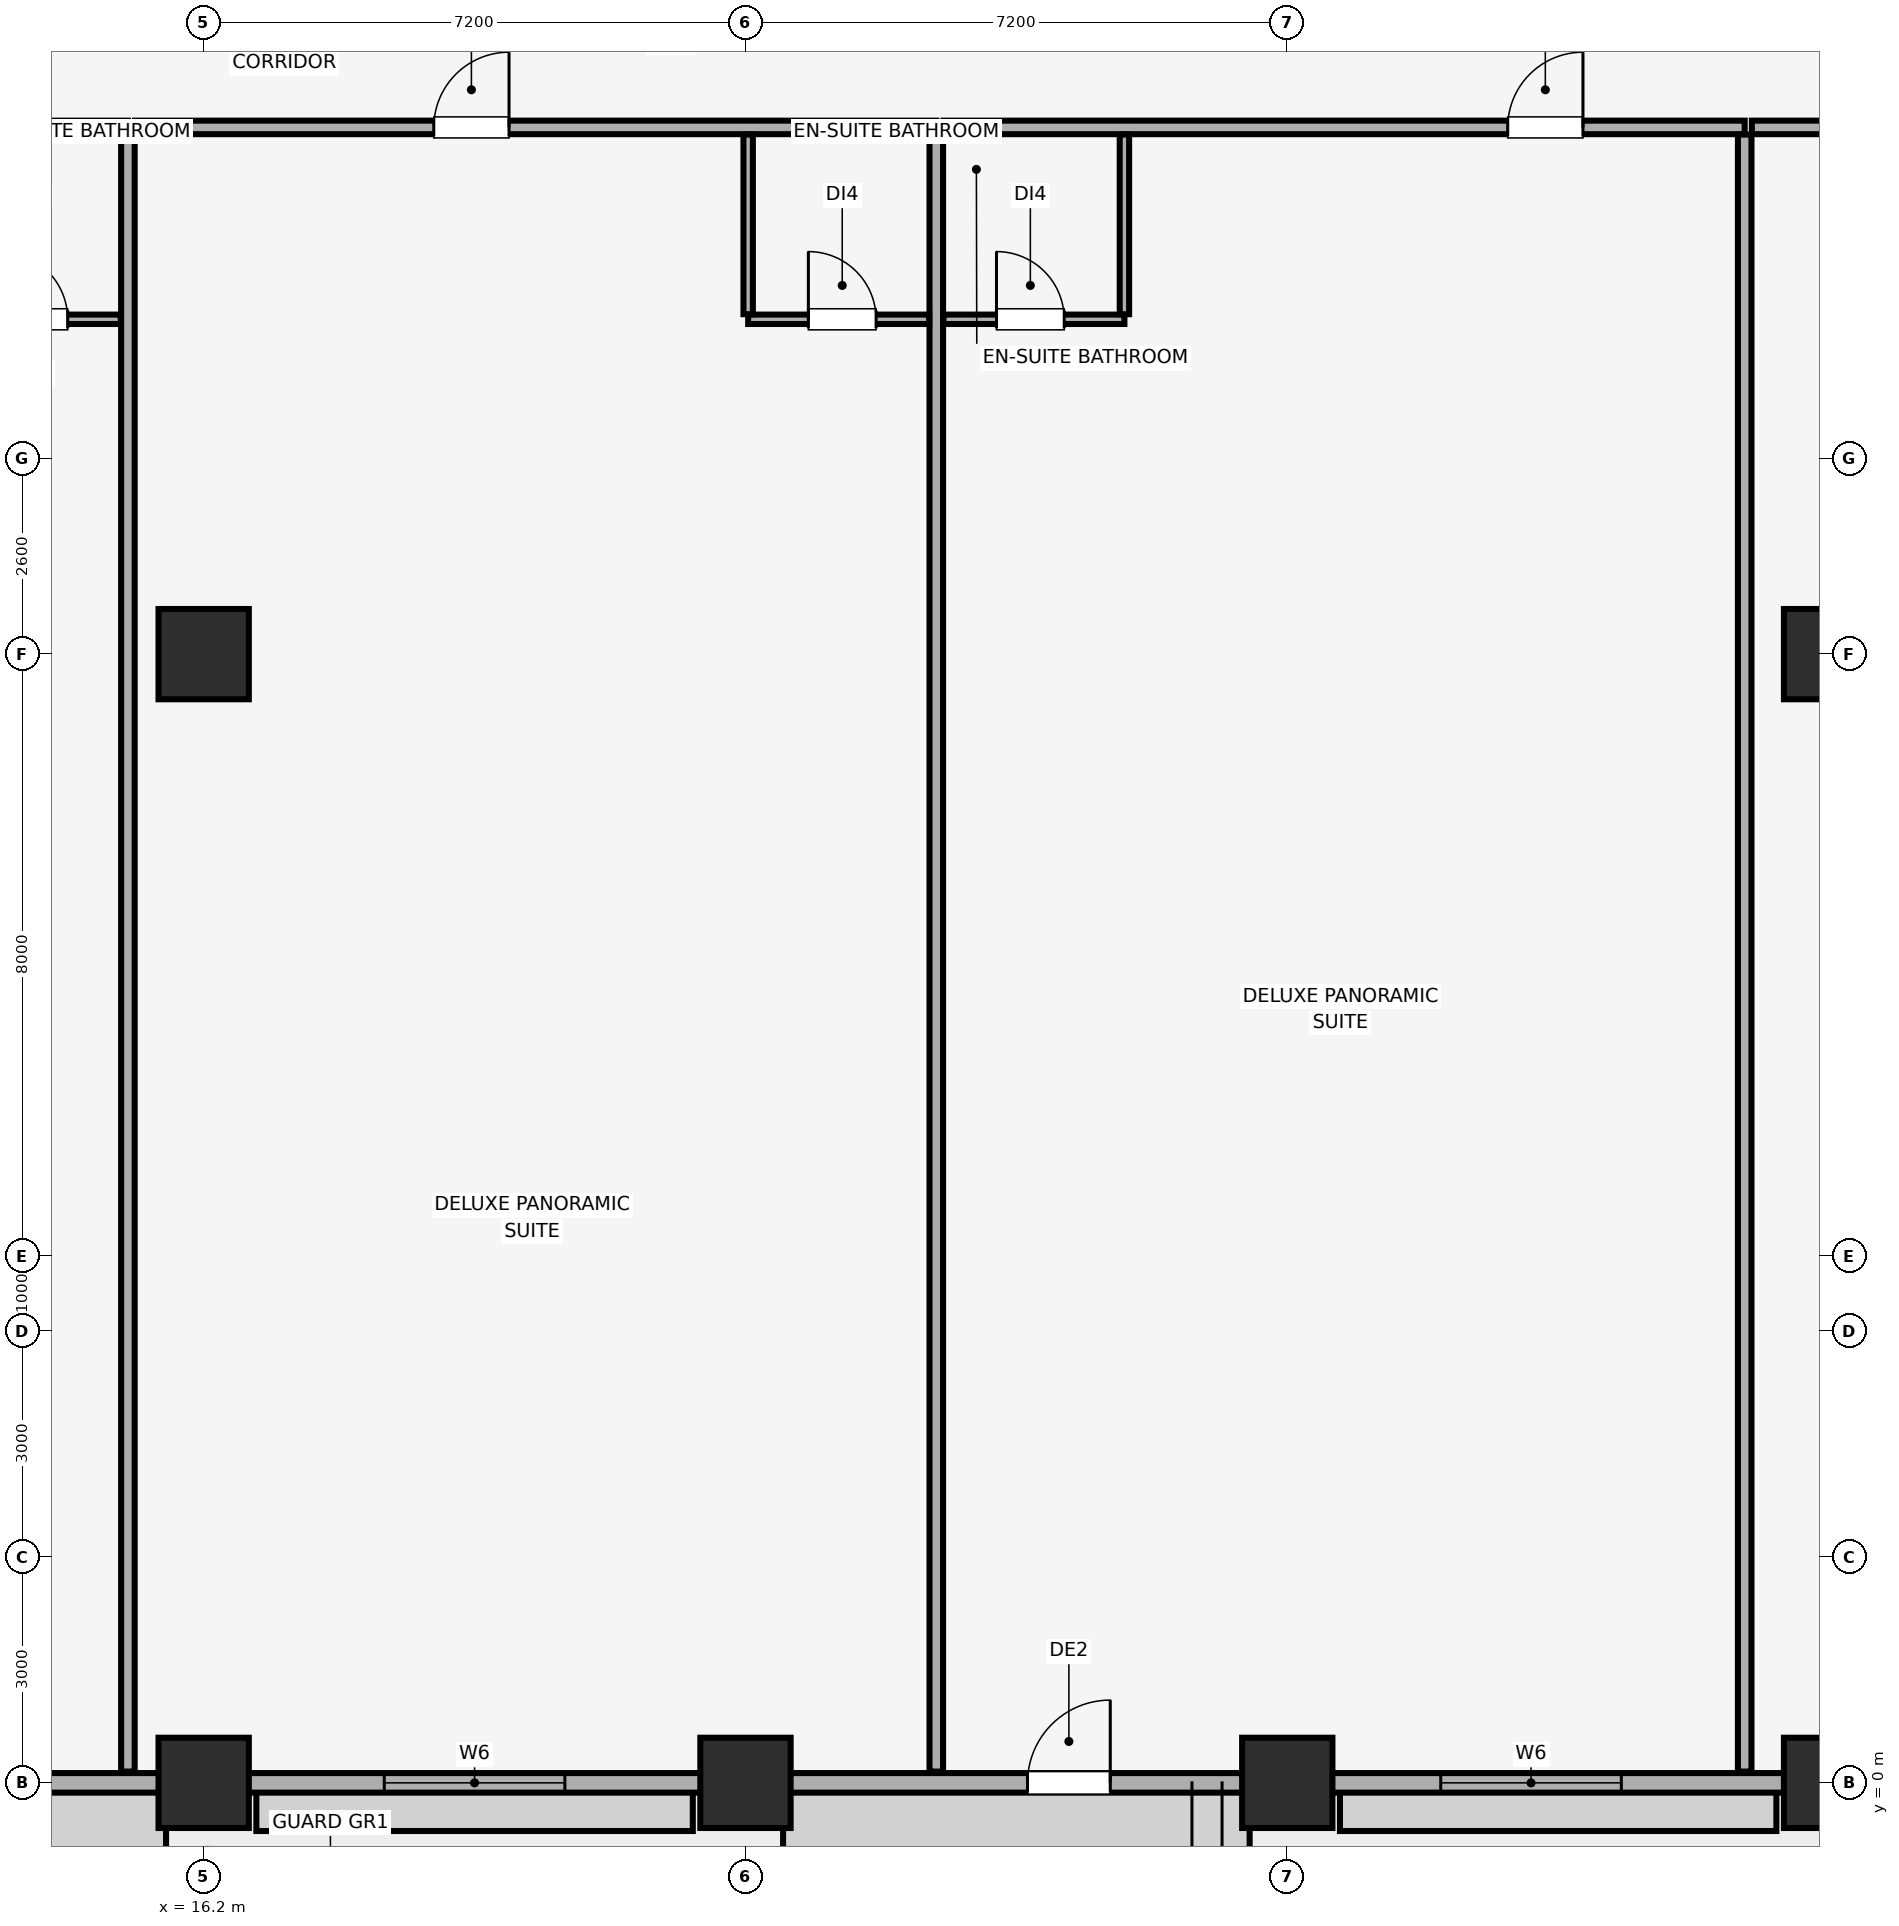
"""IFC4 building model, lengths in metres.
Left out: names, types, materials, properties, quantities, classifications, styles, units other than length and angle.
Written with IfcOpenShell. Run it as: python <this file> out.ifc"""

import sys

from ifc_helpers import new_model, si_unit, direction, frame, frame_2d, origin, origin_2d, place, context, subcontext, project, spatial, rectangle, extrude, element, fill, save


model = new_model("IFC4")
c1 = context("Model", 3, precision=1e-05, world=origin(), true_north=direction((0.0, 1.0)))
c2 = subcontext(c1, "Body", "Model", "MODEL_VIEW")
j1 = project(units=[si_unit("LENGTHUNIT", "METRE"), si_unit("PLANEANGLEUNIT", "RADIAN")], contexts=[c1])
p1 = place(None, origin())
s1 = spatial("IfcSite", under=j1, at=p1, CompositionType="ELEMENT")
p2 = place(p1, origin())
s2 = spatial("IfcBuilding", under=s1, at=p2, CompositionType="ELEMENT")
p3 = place(p2, frame((0.0, 0.0, 104.3)))
s3 = spatial("IfcBuildingStorey", under=s2, at=p3, CompositionType="ELEMENT", Elevation=104.3)
for number, where, z_axis, x_axis in (
    (1, (16.2, 0.0, 0.0), (0.0, 0.0, 1.0), (1.0, 0.0, 0.0)),
    (2, (23.4, 0.0, 0.0), (0.0, 0.0, 1.0), (1.0, 0.0, 0.0)),
    (3, (30.6, 0.0, 0.0), (0.0, 0.0, 1.0), (1.0, 0.0, 0.0)),
    (4, (37.8, 0.0, 0.0), (0.0, 0.0, 1.0), (1.0, 0.0, 0.0)),
    (5, (16.2, 15.0, 0.0), (0.0, 0.0, 1.0), (1.0, 0.0, 0.0)),
    (6, (37.8, 15.0, 0.0), (0.0, 0.0, 1.0), (1.0, 0.0, 0.0)),
):
    element("IfcColumn", number, at=place(p3, frame(where, z_axis=z_axis, x_axis=x_axis)), inside=s3, PredefinedType="COLUMN", context=c2, shape_type="SweptSolid", body=[
        extrude(rectangle(XDim=1.2, YDim=1.2, at=origin_2d()), origin(), (0.0, 0.0, 1.0), 3.51),
    ])
p4 = place(p3, frame((4.2, 0.0, 0.0), z_axis=(0.0, 0.0, 1.0), x_axis=(1.0, 0.0, 0.0)))
e7 = element("IfcWall", 7, at=p4, inside=s3, PredefinedType="SOLIDWALL", context=c2, shape_type="SweptSolid", body=[
    extrude(rectangle(XDim=75.6, YDim=0.26, at=frame_2d((37.8, 0.0))), origin(), (0.0, 0.0, 1.0), 2.56),
])
p5 = place(p4, frame((22.948, 0.0, 0.0)))
e8 = element("IfcOpeningElement", 8, at=p5, cuts=e7, PredefinedType="OPENING", context=c2, shape_type="SweptSolid", body=[
    extrude(rectangle(XDim=1.1, YDim=2.15, at=frame_2d((0.55, 1.075))), frame((0.0, 0.14, 0.0), z_axis=(0.0, -1.0, 0.0), x_axis=(1.0, 0.0, 0.0)), (0.0, 0.0, 1.0), 0.28),
])
p6 = place(p4, frame((44.61, 0.0, 0.0)))
e9 = element("IfcOpeningElement", 9, at=p6, cuts=e7, PredefinedType="OPENING", context=c2, shape_type="SweptSolid", body=[
    extrude(rectangle(XDim=1.1, YDim=2.15, at=frame_2d((0.55, 1.075))), frame((0.0, 0.14, 0.0), z_axis=(0.0, -1.0, 0.0), x_axis=(1.0, 0.0, 0.0)), (0.0, 0.0, 1.0), 0.28),
])
p7 = place(p4, frame((66.272, 0.0, 0.0)))
e10 = element("IfcOpeningElement", 10, at=p7, cuts=e7, PredefinedType="OPENING", context=c2, shape_type="SweptSolid", body=[
    extrude(rectangle(XDim=1.1, YDim=2.15, at=frame_2d((0.55, 1.075))), frame((0.0, 0.14, 0.0), z_axis=(0.0, -1.0, 0.0), x_axis=(1.0, 0.0, 0.0)), (0.0, 0.0, 1.0), 0.28),
])
p8 = place(p4, frame((1.035, 0.0, 0.85)))
e11 = element("IfcOpeningElement", 11, at=p8, cuts=e7, PredefinedType="OPENING", context=c2, shape_type="SweptSolid", body=[
    extrude(rectangle(XDim=2.4, YDim=1.5, at=frame_2d((1.2, 0.75))), frame((0.0, 0.14, 0.0), z_axis=(0.0, -1.0, 0.0), x_axis=(1.0, 0.0, 0.0)), (0.0, 0.0, 1.0), 0.28),
])
p9 = place(p4, frame((6.896, 0.0, 0.85)))
e12 = element("IfcOpeningElement", 12, at=p9, cuts=e7, PredefinedType="OPENING", context=c2, shape_type="SweptSolid", body=[
    extrude(rectangle(XDim=2.4, YDim=1.5, at=frame_2d((1.2, 0.75))), frame((0.0, 0.14, 0.0), z_axis=(0.0, -1.0, 0.0), x_axis=(1.0, 0.0, 0.0)), (0.0, 0.0, 1.0), 0.28),
])
p10 = place(p4, frame((14.4, 0.0, 0.85)))
e13 = element("IfcOpeningElement", 13, at=p10, cuts=e7, PredefinedType="OPENING", context=c2, shape_type="SweptSolid", body=[
    extrude(rectangle(XDim=2.4, YDim=1.5, at=frame_2d((1.2, 0.75))), frame((0.0, 0.14, 0.0), z_axis=(0.0, -1.0, 0.0), x_axis=(1.0, 0.0, 0.0)), (0.0, 0.0, 1.0), 0.28),
])
p11 = place(p4, frame((28.439, 0.0, 0.85)))
e14 = element("IfcOpeningElement", 14, at=p11, cuts=e7, PredefinedType="OPENING", context=c2, shape_type="SweptSolid", body=[
    extrude(rectangle(XDim=2.4, YDim=1.5, at=frame_2d((1.2, 0.75))), frame((0.0, 0.14, 0.0), z_axis=(0.0, -1.0, 0.0), x_axis=(1.0, 0.0, 0.0)), (0.0, 0.0, 1.0), 0.28),
])
p12 = place(p4, frame((36.6, 0.0, 0.85)))
e15 = element("IfcOpeningElement", 15, at=p12, cuts=e7, PredefinedType="OPENING", context=c2, shape_type="SweptSolid", body=[
    extrude(rectangle(XDim=2.4, YDim=1.5, at=frame_2d((1.2, 0.75))), frame((0.0, 0.14, 0.0), z_axis=(0.0, -1.0, 0.0), x_axis=(1.0, 0.0, 0.0)), (0.0, 0.0, 1.0), 0.28),
])
p13 = place(p4, frame((46.59, 0.0, 0.85)))
e16 = element("IfcOpeningElement", 16, at=p13, cuts=e7, PredefinedType="OPENING", context=c2, shape_type="SweptSolid", body=[
    extrude(rectangle(XDim=1.5, YDim=1.4, at=frame_2d((0.75, 0.7))), frame((0.0, 0.14, 0.0), z_axis=(0.0, -1.0, 0.0), x_axis=(1.0, 0.0, 0.0)), (0.0, 0.0, 1.0), 0.28),
])
p14 = place(p4, frame((50.583, 0.0, 0.85)))
e17 = element("IfcOpeningElement", 17, at=p14, cuts=e7, PredefinedType="OPENING", context=c2, shape_type="SweptSolid", body=[
    extrude(rectangle(XDim=2.4, YDim=1.5, at=frame_2d((1.2, 0.75))), frame((0.0, 0.14, 0.0), z_axis=(0.0, -1.0, 0.0), x_axis=(1.0, 0.0, 0.0)), (0.0, 0.0, 1.0), 0.28),
])
p15 = place(p4, frame((58.8, 0.0, 0.85)))
e18 = element("IfcOpeningElement", 18, at=p15, cuts=e7, PredefinedType="OPENING", context=c2, shape_type="SweptSolid", body=[
    extrude(rectangle(XDim=2.4, YDim=1.5, at=frame_2d((1.2, 0.75))), frame((0.0, 0.14, 0.0), z_axis=(0.0, -1.0, 0.0), x_axis=(1.0, 0.0, 0.0)), (0.0, 0.0, 1.0), 0.28),
])
p16 = place(p4, frame((68.221, 0.0, 0.85)))
e19 = element("IfcOpeningElement", 19, at=p16, cuts=e7, PredefinedType="OPENING", context=c2, shape_type="SweptSolid", body=[
    extrude(rectangle(XDim=1.5, YDim=1.4, at=frame_2d((0.75, 0.7))), frame((0.0, 0.14, 0.0), z_axis=(0.0, -1.0, 0.0), x_axis=(1.0, 0.0, 0.0)), (0.0, 0.0, 1.0), 0.28),
])
p17 = place(p4, frame((72.165, 0.0, 0.85)))
e20 = element("IfcOpeningElement", 20, at=p17, cuts=e7, PredefinedType="OPENING", context=c2, shape_type="SweptSolid", body=[
    extrude(rectangle(XDim=2.4, YDim=1.5, at=frame_2d((1.2, 0.75))), frame((0.0, 0.14, 0.0), z_axis=(0.0, -1.0, 0.0), x_axis=(1.0, 0.0, 0.0)), (0.0, 0.0, 1.0), 0.28),
])
p18 = place(p3, frame((0.15, 22.0, 0.0), z_axis=(0.0, 0.0, 1.0), x_axis=(1.0, 0.0, 0.0)))
e21 = element("IfcWall", 21, at=p18, inside=s3, PredefinedType="PARTITIONING", context=c2, shape_type="SweptSolid", body=[
    extrude(rectangle(XDim=15.043, YDim=0.18, at=frame_2d((7.521, 0.0))), origin(), (0.0, 0.0, 1.0), 3.51),
])
p19 = place(p18, frame((5.685, 0.0, 0.0)))
e22 = element("IfcOpeningElement", 22, at=p19, cuts=e21, PredefinedType="OPENING", context=c2, shape_type="SweptSolid", body=[
    extrude(rectangle(XDim=1.0, YDim=2.15, at=frame_2d((0.5, 1.075))), frame((0.0, 0.1, 0.0), z_axis=(0.0, -1.0, 0.0), x_axis=(1.0, 0.0, 0.0)), (0.0, 0.0, 1.0), 0.2),
])
p20 = place(p3, frame((15.193, 0.15, 0.0), z_axis=(0.0, 0.0, 1.0), x_axis=(0.0, 1.0, 0.0)))
e23 = element("IfcWall", 23, at=p20, inside=s3, PredefinedType="PARTITIONING", context=c2, shape_type="SweptSolid", body=[
    extrude(rectangle(XDim=21.755, YDim=0.18, at=frame_2d((10.877, 0.0))), origin(), (0.0, 0.0, 1.0), 3.51),
])
p21 = place(p3, frame((12.693, 19.45, 0.0), z_axis=(0.0, 0.0, 1.0), x_axis=(1.0, 0.0, 0.0)))
e24 = element("IfcWall", 24, at=p21, inside=s3, PredefinedType="PARTITIONING", context=c2, shape_type="SweptSolid", body=[
    extrude(rectangle(XDim=2.405, YDim=0.125, at=frame_2d((1.203, 0.0))), origin(), (0.0, 0.0, 1.0), 3.51),
])
p22 = place(p21, frame((0.8, 0.0, 0.0)))
e25 = element("IfcOpeningElement", 25, at=p22, cuts=e24, PredefinedType="OPENING", context=c2, shape_type="SweptSolid", body=[
    extrude(rectangle(XDim=0.9, YDim=2.1, at=frame_2d((0.45, 1.05))), frame((0.0, 0.073, 0.0), z_axis=(0.0, -1.0, 0.0), x_axis=(1.0, 0.0, 0.0)), (0.0, 0.0, 1.0), 0.145),
])
p23 = place(p3, frame((15.288, 22.0, 0.0), z_axis=(0.0, 0.0, 1.0), x_axis=(1.0, 0.0, 0.0)))
e26 = element("IfcWall", 26, at=p23, inside=s3, PredefinedType="PARTITIONING", context=c2, shape_type="SweptSolid", body=[
    extrude(rectangle(XDim=10.648, YDim=0.18, at=frame_2d((5.324, 0.0))), origin(), (0.0, 0.0, 1.0), 3.51),
])
p24 = place(p23, frame((3.97, 0.0, 0.0)))
e27 = element("IfcOpeningElement", 27, at=p24, cuts=e26, PredefinedType="OPENING", context=c2, shape_type="SweptSolid", body=[
    extrude(rectangle(XDim=1.0, YDim=2.15, at=frame_2d((0.5, 1.075))), frame((0.0, 0.1, 0.0), z_axis=(0.0, -1.0, 0.0), x_axis=(1.0, 0.0, 0.0)), (0.0, 0.0, 1.0), 0.2),
])
p25 = place(p3, frame((25.936, 0.15, 0.0), z_axis=(0.0, 0.0, 1.0), x_axis=(0.0, 1.0, 0.0)))
e28 = element("IfcWall", 28, at=p25, inside=s3, PredefinedType="PARTITIONING", context=c2, shape_type="SweptSolid", body=[
    extrude(rectangle(XDim=21.755, YDim=0.18, at=frame_2d((10.877, 0.0))), origin(), (0.0, 0.0, 1.0), 3.51),
])
p26 = place(p3, frame((23.436, 19.45, 0.0), z_axis=(0.0, 0.0, 1.0), x_axis=(1.0, 0.0, 0.0)))
e29 = element("IfcWall", 29, at=p26, inside=s3, PredefinedType="PARTITIONING", context=c2, shape_type="SweptSolid", body=[
    extrude(rectangle(XDim=2.405, YDim=0.125, at=frame_2d((1.203, 0.0))), origin(), (0.0, 0.0, 1.0), 3.51),
])
p27 = place(p26, frame((0.8, 0.0, 0.0)))
e30 = element("IfcOpeningElement", 30, at=p27, cuts=e29, PredefinedType="OPENING", context=c2, shape_type="SweptSolid", body=[
    extrude(rectangle(XDim=0.9, YDim=2.1, at=frame_2d((0.45, 1.05))), frame((0.0, 0.073, 0.0), z_axis=(0.0, -1.0, 0.0), x_axis=(1.0, 0.0, 0.0)), (0.0, 0.0, 1.0), 0.145),
])
p28 = place(p3, frame((23.436, 19.518, 0.0), z_axis=(0.0, 0.0, 1.0), x_axis=(0.0, 1.0, 0.0)))
e31 = element("IfcWall", 31, at=p28, inside=s3, PredefinedType="PARTITIONING", context=c2, shape_type="SweptSolid", body=[
    extrude(rectangle(XDim=2.387, YDim=0.125, at=frame_2d((1.194, 0.0))), origin(), (0.0, 0.0, 1.0), 2.977),
])
p29 = place(p3, frame((26.031, 22.0, 0.0), z_axis=(0.0, 0.0, 1.0), x_axis=(1.0, 0.0, 0.0)))
e32 = element("IfcWall", 32, at=p29, inside=s3, PredefinedType="PARTITIONING", context=c2, shape_type="SweptSolid", body=[
    extrude(rectangle(XDim=10.648, YDim=0.18, at=frame_2d((5.324, 0.0))), origin(), (0.0, 0.0, 1.0), 3.51),
])
p30 = place(p29, frame((7.499, 0.0, 0.0)))
e33 = element("IfcOpeningElement", 33, at=p30, cuts=e32, PredefinedType="OPENING", context=c2, shape_type="SweptSolid", body=[
    extrude(rectangle(XDim=1.0, YDim=2.15, at=frame_2d((0.5, 1.075))), frame((0.0, 0.1, 0.0), z_axis=(0.0, -1.0, 0.0), x_axis=(1.0, 0.0, 0.0)), (0.0, 0.0, 1.0), 0.2),
])
p31 = place(p3, frame((36.679, 0.15, 0.0), z_axis=(0.0, 0.0, 1.0), x_axis=(0.0, 1.0, 0.0)))
e34 = element("IfcWall", 34, at=p31, inside=s3, PredefinedType="PARTITIONING", context=c2, shape_type="SweptSolid", body=[
    extrude(rectangle(XDim=21.755, YDim=0.18, at=frame_2d((10.877, 0.0))), origin(), (0.0, 0.0, 1.0), 3.51),
])
p32 = place(p3, frame((26.031, 19.45, 0.0), z_axis=(0.0, 0.0, 1.0), x_axis=(1.0, 0.0, 0.0)))
e35 = element("IfcWall", 35, at=p32, inside=s3, PredefinedType="PARTITIONING", context=c2, shape_type="SweptSolid", body=[
    extrude(rectangle(XDim=2.405, YDim=0.125, at=frame_2d((1.203, 0.0))), origin(), (0.0, 0.0, 1.0), 3.51),
])
p33 = place(p32, frame((0.705, 0.0, 0.0)))
e36 = element("IfcOpeningElement", 36, at=p33, cuts=e35, PredefinedType="OPENING", context=c2, shape_type="SweptSolid", body=[
    extrude(rectangle(XDim=0.9, YDim=2.1, at=frame_2d((0.45, 1.05))), frame((0.0, 0.073, 0.0), z_axis=(0.0, -1.0, 0.0), x_axis=(1.0, 0.0, 0.0)), (0.0, 0.0, 1.0), 0.145),
])
p34 = place(p3, frame((28.436, 19.518, 0.0), z_axis=(0.0, 0.0, 1.0), x_axis=(0.0, 1.0, 0.0)))
e37 = element("IfcWall", 37, at=p34, inside=s3, PredefinedType="PARTITIONING", context=c2, shape_type="SweptSolid", body=[
    extrude(rectangle(XDim=2.387, YDim=0.125, at=frame_2d((1.194, 0.0))), origin(), (0.0, 0.0, 1.0), 3.51),
])
p35 = place(p3, frame((36.774, 22.0, 0.0), z_axis=(0.0, 0.0, 1.0), x_axis=(1.0, 0.0, 0.0)))
e38 = element("IfcWall", 38, at=p35, inside=s3, PredefinedType="PARTITIONING", context=c2, shape_type="SweptSolid", body=[
    extrude(rectangle(XDim=10.648, YDim=0.18, at=frame_2d((5.324, 0.0))), origin(), (0.0, 0.0, 1.0), 3.51),
])
p36 = place(p35, frame((4.027, 0.0, 0.0)))
e39 = element("IfcOpeningElement", 39, at=p36, cuts=e38, PredefinedType="OPENING", context=c2, shape_type="SweptSolid", body=[
    extrude(rectangle(XDim=1.0, YDim=2.15, at=frame_2d((0.5, 1.075))), frame((0.0, 0.1, 0.0), z_axis=(0.0, -1.0, 0.0), x_axis=(1.0, 0.0, 0.0)), (0.0, 0.0, 1.0), 0.2),
])
p37 = place(p5, origin())
e40 = element("IfcDoor", 40, at=p37, inside=s3, OperationType="SINGLE_SWING_RIGHT", PredefinedType="DOOR", context=c2, shape_type="SweptSolid", body=[
    extrude(rectangle(XDim=1.1, YDim=2.15, at=frame_2d((0.55, 1.075))), frame((0.0, 0.025, 0.0), z_axis=(0.0, -1.0, 0.0), x_axis=(1.0, 0.0, 0.0)), (0.0, 0.0, 1.0), 0.05),
])
fill(e8, e40)
p38 = place(p10, origin())
e41 = element("IfcWindow", 41, at=p38, inside=s3, PartitioningType="SINGLE_PANEL", PredefinedType="WINDOW", context=c2, shape_type="SweptSolid", body=[
    extrude(rectangle(XDim=2.4, YDim=1.5, at=frame_2d((1.2, 0.75))), frame((0.0, 0.03, 0.0), z_axis=(0.0, -1.0, 0.0), x_axis=(1.0, 0.0, 0.0)), (0.0, 0.0, 1.0), 0.06),
])
fill(e13, e41)
p39 = place(p11, origin())
e42 = element("IfcWindow", 42, at=p39, inside=s3, PartitioningType="SINGLE_PANEL", PredefinedType="WINDOW", context=c2, shape_type="SweptSolid", body=[
    extrude(rectangle(XDim=2.4, YDim=1.5, at=frame_2d((1.2, 0.75))), frame((0.0, 0.03, 0.0), z_axis=(0.0, -1.0, 0.0), x_axis=(1.0, 0.0, 0.0)), (0.0, 0.0, 1.0), 0.06),
])
fill(e14, e42)
p40 = place(p22, origin())
e43 = element("IfcDoor", 43, at=p40, inside=s3, OperationType="SINGLE_SWING_LEFT", PredefinedType="DOOR", context=c2, shape_type="SweptSolid", body=[
    extrude(rectangle(XDim=0.9, YDim=2.1, at=frame_2d((0.45, 1.05))), frame((0.0, 0.025, 0.0), z_axis=(0.0, -1.0, 0.0), x_axis=(1.0, 0.0, 0.0)), (0.0, 0.0, 1.0), 0.05),
])
fill(e25, e43)
p41 = place(p24, origin())
e44 = element("IfcDoor", 44, at=p41, inside=s3, OperationType="SINGLE_SWING_RIGHT", PredefinedType="DOOR", context=c2, shape_type="SweptSolid", body=[
    extrude(rectangle(XDim=1.0, YDim=2.15, at=frame_2d((0.5, 1.075))), frame((0.0, 0.025, 0.0), z_axis=(0.0, -1.0, 0.0), x_axis=(1.0, 0.0, 0.0)), (0.0, 0.0, 1.0), 0.05),
])
fill(e27, e44)
p42 = place(p27, origin())
e45 = element("IfcDoor", 45, at=p42, inside=s3, OperationType="SINGLE_SWING_LEFT", PredefinedType="DOOR", context=c2, shape_type="SweptSolid", body=[
    extrude(rectangle(XDim=0.9, YDim=2.1, at=frame_2d((0.45, 1.05))), frame((0.0, 0.025, 0.0), z_axis=(0.0, -1.0, 0.0), x_axis=(1.0, 0.0, 0.0)), (0.0, 0.0, 1.0), 0.05),
])
fill(e30, e45)
p43 = place(p30, origin())
e46 = element("IfcDoor", 46, at=p43, inside=s3, OperationType="SINGLE_SWING_RIGHT", PredefinedType="DOOR", context=c2, shape_type="SweptSolid", body=[
    extrude(rectangle(XDim=1.0, YDim=2.15, at=frame_2d((0.5, 1.075))), frame((0.0, 0.025, 0.0), z_axis=(0.0, -1.0, 0.0), x_axis=(1.0, 0.0, 0.0)), (0.0, 0.0, 1.0), 0.05),
])
fill(e33, e46)
p44 = place(p33, origin())
e47 = element("IfcDoor", 47, at=p44, inside=s3, OperationType="SINGLE_SWING_LEFT", PredefinedType="DOOR", context=c2, shape_type="SweptSolid", body=[
    extrude(rectangle(XDim=0.9, YDim=2.1, at=frame_2d((0.45, 1.05))), frame((0.0, 0.025, 0.0), z_axis=(0.0, -1.0, 0.0), x_axis=(1.0, 0.0, 0.0)), (0.0, 0.0, 1.0), 0.05),
])
fill(e36, e47)
save(model, sys.argv[1])
